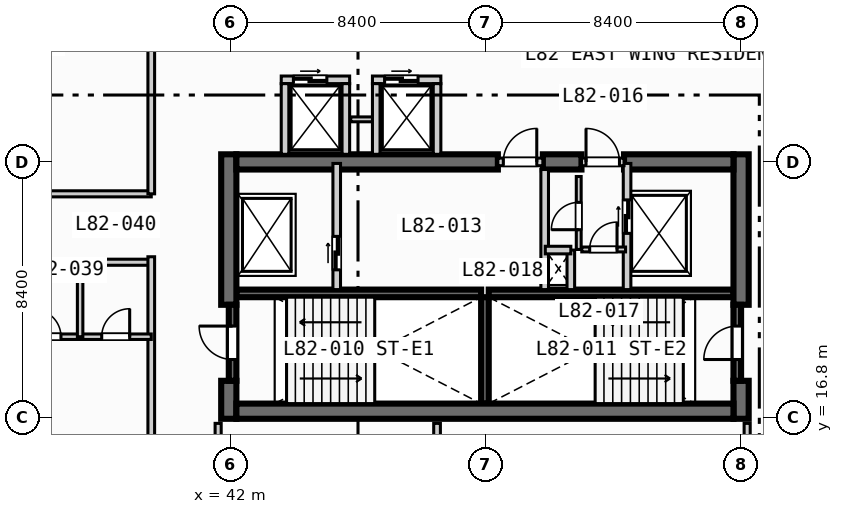
"""IFC4 building model, lengths in metres.
Left out: names, types, materials, properties, quantities, classifications, styles, units other than length and angle.
Written with IfcOpenShell. Run it as: python <this file> out.ifc"""

import sys

from ifc_helpers import new_model, si_unit, direction, frame, frame_2d, origin, place, context, subcontext, project, spatial, rectangle, extrude, element, fill, save


model = new_model("IFC4")
c1 = context("Model", 3, precision=1e-05, world=origin(), true_north=direction((0.0, 1.0)))
c2 = subcontext(c1, "Body", "Model", "MODEL_VIEW")
j1 = project(units=[si_unit("LENGTHUNIT", "METRE"), si_unit("PLANEANGLEUNIT", "RADIAN")], contexts=[c1])
p1 = place(None, origin())
s1 = spatial("IfcSite", under=j1, at=p1, CompositionType="ELEMENT")
p2 = place(p1, origin())
s2 = spatial("IfcBuilding", under=s1, at=p2, CompositionType="ELEMENT")
p3 = place(p2, frame((0.0, 0.0, 332.0)))
s3 = spatial("IfcBuildingStorey", under=s2, at=p3, CompositionType="ELEMENT", Elevation=332.0)
for number, where, z_axis, x_axis in (
    (1, (42.2, 20.875, 0.0), (0.0, 0.0, 1.0), (1.0, 0.0, 0.0)),
    (2, (50.5, 20.875, 0.0), (0.0, 0.0, 1.0), (1.0, 0.0, 0.0)),
):
    element("IfcWall", number, at=place(p3, frame(where, z_axis=z_axis, x_axis=x_axis)), inside=s3, PredefinedType="SOLIDWALL", context=c2, shape_type="SweptSolid", body=[
        extrude(rectangle(XDim=8.05, YDim=0.25, at=frame_2d((4.025, 0.0))), origin(), (0.0, 0.0, 1.0), 3.67),
    ])
p4 = place(p3, frame((50.375, 17.25, 0.0), z_axis=(0.0, 0.0, 1.0), x_axis=(0.0, 1.0, 0.0)))
e3 = element("IfcWall", 3, at=p4, inside=s3, PredefinedType="SOLIDWALL", context=c2, shape_type="SweptSolid", body=[
    extrude(rectangle(XDim=3.5, YDim=0.25, at=frame_2d((1.75, 0.0))), origin(), (0.0, 0.0, 1.0), 3.67),
])
p5 = place(p3, frame((41.95, 16.75, 0.0), z_axis=(0.0, 0.0, 1.0), x_axis=(0.0, 1.0, 0.0)))
e4 = element("IfcWall", 4, at=p5, inside=s3, PredefinedType="SHEAR", context=c2, shape_type="SweptSolid", body=[
    extrude(rectangle(XDim=1.25, YDim=0.5, at=frame_2d((0.625, 0.0))), origin(), (0.0, 0.0, 1.0), 3.67),
])
p6 = place(p3, frame((41.95, 20.5, 0.0), z_axis=(0.0, 0.0, 1.0), x_axis=(0.0, 1.0, 0.0)))
e5 = element("IfcWall", 5, at=p6, inside=s3, PredefinedType="SHEAR", context=c2, shape_type="SweptSolid", body=[
    extrude(rectangle(XDim=4.95, YDim=0.5, at=frame_2d((2.475, 0.0))), origin(), (0.0, 0.0, 1.0), 3.67),
])
p7 = place(p3, frame((58.8, 16.75, 0.0), z_axis=(0.0, 0.0, 1.0), x_axis=(0.0, 1.0, 0.0)))
e6 = element("IfcWall", 6, at=p7, inside=s3, PredefinedType="SHEAR", context=c2, shape_type="SweptSolid", body=[
    extrude(rectangle(XDim=1.25, YDim=0.5, at=frame_2d((0.625, 0.0))), origin(), (0.0, 0.0, 1.0), 3.67),
])
p8 = place(p3, frame((58.8, 20.5, 0.0), z_axis=(0.0, 0.0, 1.0), x_axis=(0.0, 1.0, 0.0)))
e7 = element("IfcWall", 7, at=p8, inside=s3, PredefinedType="SHEAR", context=c2, shape_type="SweptSolid", body=[
    extrude(rectangle(XDim=4.95, YDim=0.5, at=frame_2d((2.475, 0.0))), origin(), (0.0, 0.0, 1.0), 3.67),
])
p9 = place(p3, frame((42.2, 17.0, 0.0), z_axis=(0.0, 0.0, 1.0), x_axis=(1.0, 0.0, 0.0)))
e8 = element("IfcWall", 8, at=p9, inside=s3, PredefinedType="SHEAR", context=c2, shape_type="SweptSolid", body=[
    extrude(rectangle(XDim=16.35, YDim=0.5, at=frame_2d((8.175, 0.0))), origin(), (0.0, 0.0, 1.0), 3.67),
])
p10 = place(p3, frame((42.2, 25.2, 0.0), z_axis=(0.0, 0.0, 1.0), x_axis=(1.0, 0.0, 0.0)))
e9 = element("IfcWall", 9, at=p10, inside=s3, PredefinedType="SHEAR", context=c2, shape_type="SweptSolid", body=[
    extrude(rectangle(XDim=8.6, YDim=0.5, at=frame_2d((4.3, 0.0))), origin(), (0.0, 0.0, 1.0), 3.67),
])
p11 = place(p3, frame((52.28, 25.2, 0.0), z_axis=(0.0, 0.0, 1.0), x_axis=(1.0, 0.0, 0.0)))
e10 = element("IfcWall", 10, at=p11, inside=s3, PredefinedType="SHEAR", context=c2, shape_type="SweptSolid", body=[
    extrude(rectangle(XDim=1.27, YDim=0.5, at=frame_2d((0.635, 0.0))), origin(), (0.0, 0.0, 1.0), 3.67),
])
p12 = place(p3, frame((54.95, 25.2, 0.0), z_axis=(0.0, 0.0, 1.0), x_axis=(1.0, 0.0, 0.0)))
e11 = element("IfcWall", 11, at=p12, inside=s3, PredefinedType="SHEAR", context=c2, shape_type="SweptSolid", body=[
    extrude(rectangle(XDim=3.6, YDim=0.5, at=frame_2d((1.8, 0.0))), origin(), (0.0, 0.0, 1.0), 3.67),
])
p13 = place(p3, frame((42.075, 18.0, 0.0), z_axis=(0.0, 0.0, 1.0), x_axis=(0.0, 1.0, 0.0)))
e12 = element("IfcWall", 12, at=p13, inside=s3, PredefinedType="SOLIDWALL", context=c2, shape_type="SweptSolid", body=[
    extrude(rectangle(XDim=2.5, YDim=0.25, at=frame_2d((1.25, 0.0))), origin(), (0.0, 0.0, 1.0), 3.67),
])
p14 = place(p13, frame((0.7, 0.0, 0.0)))
e13 = element("IfcOpeningElement", 13, at=p14, cuts=e12, PredefinedType="OPENING", context=c2, shape_type="SweptSolid", body=[
    extrude(rectangle(XDim=1.1, YDim=2.15, at=frame_2d((0.55, 1.075))), frame((0.0, 0.135, 0.0), z_axis=(0.0, -1.0, 0.0), x_axis=(1.0, 0.0, 0.0)), (0.0, 0.0, 1.0), 0.27),
])
p15 = place(p3, frame((58.675, 18.0, 0.0), z_axis=(0.0, 0.0, 1.0), x_axis=(0.0, 1.0, 0.0)))
e14 = element("IfcWall", 14, at=p15, inside=s3, PredefinedType="SOLIDWALL", context=c2, shape_type="SweptSolid", body=[
    extrude(rectangle(XDim=2.5, YDim=0.25, at=frame_2d((1.25, 0.0))), origin(), (0.0, 0.0, 1.0), 3.67),
])
p16 = place(p15, frame((0.7, 0.0, 0.0)))
e15 = element("IfcOpeningElement", 15, at=p16, cuts=e14, PredefinedType="OPENING", context=c2, shape_type="SweptSolid", body=[
    extrude(rectangle(XDim=1.1, YDim=2.15, at=frame_2d((0.55, 1.075))), frame((0.0, 0.135, 0.0), z_axis=(0.0, -1.0, 0.0), x_axis=(1.0, 0.0, 0.0)), (0.0, 0.0, 1.0), 0.27),
])
p17 = place(p3, frame((45.5, 21.0, 0.0), z_axis=(0.0, 0.0, 1.0), x_axis=(0.0, 1.0, 0.0)))
e16 = element("IfcWall", 16, at=p17, inside=s3, PredefinedType="SOLIDWALL", context=c2, shape_type="SweptSolid", body=[
    extrude(rectangle(XDim=4.15, YDim=0.25, at=frame_2d((2.075, 0.0))), origin(), (0.0, 0.0, 1.0), 3.67),
])
p18 = place(p17, frame((0.65, 0.0, 0.0)))
e17 = element("IfcOpeningElement", 17, at=p18, cuts=e16, PredefinedType="OPENING", context=c2, shape_type="SweptSolid", body=[
    extrude(rectangle(XDim=1.1, YDim=2.15, at=frame_2d((0.55, 1.075))), frame((0.0, 0.135, 0.0), z_axis=(0.0, -1.0, 0.0), x_axis=(1.0, 0.0, 0.0)), (0.0, 0.0, 1.0), 0.27),
])
p19 = place(p3, frame((50.8, 25.2, 0.0), z_axis=(0.0, 0.0, 1.0), x_axis=(1.0, 0.0, 0.0)))
e18 = element("IfcWall", 18, at=p19, inside=s3, PredefinedType="SOLIDWALL", context=c2, shape_type="SweptSolid", body=[
    extrude(rectangle(XDim=1.48, YDim=0.25, at=frame_2d((0.74, 0.0))), origin(), (0.0, 0.0, 1.0), 3.67),
])
p20 = place(p19, frame((0.18, 0.0, 0.0)))
e19 = element("IfcOpeningElement", 19, at=p20, cuts=e18, PredefinedType="OPENING", context=c2, shape_type="SweptSolid", body=[
    extrude(rectangle(XDim=1.1, YDim=2.15, at=frame_2d((0.55, 1.075))), frame((0.0, 0.135, 0.0), z_axis=(0.0, -1.0, 0.0), x_axis=(1.0, 0.0, 0.0)), (0.0, 0.0, 1.0), 0.27),
])
p21 = place(p3, frame((52.34, 21.0, 0.0), z_axis=(0.0, 0.0, 1.0), x_axis=(0.0, 1.0, 0.0)))
e20 = element("IfcWall", 20, at=p21, inside=s3, PredefinedType="SOLIDWALL", context=c2, shape_type="SweptSolid", body=[
    extrude(rectangle(XDim=3.95, YDim=0.25, at=frame_2d((1.975, 0.0))), origin(), (0.0, 0.0, 1.0), 3.67),
])
p22 = place(p3, frame((55.05, 21.0, 0.0), z_axis=(0.0, 0.0, 1.0), x_axis=(0.0, 1.0, 0.0)))
e21 = element("IfcWall", 21, at=p22, inside=s3, PredefinedType="SOLIDWALL", context=c2, shape_type="SweptSolid", body=[
    extrude(rectangle(XDim=4.15, YDim=0.25, at=frame_2d((2.075, 0.0))), origin(), (0.0, 0.0, 1.0), 3.67),
])
p23 = place(p22, frame((1.85, 0.0, 0.0)))
e22 = element("IfcOpeningElement", 22, at=p23, cuts=e21, PredefinedType="OPENING", context=c2, shape_type="SweptSolid", body=[
    extrude(rectangle(XDim=1.1, YDim=2.15, at=frame_2d((0.55, 1.075))), frame((0.0, 0.135, 0.0), z_axis=(0.0, -1.0, 0.0), x_axis=(1.0, 0.0, 0.0)), (0.0, 0.0, 1.0), 0.27),
])
p24 = place(p3, frame((53.55, 25.2, 0.0), z_axis=(0.0, 0.0, 1.0), x_axis=(1.0, 0.0, 0.0)))
e23 = element("IfcWall", 23, at=p24, inside=s3, PredefinedType="SOLIDWALL", context=c2, shape_type="SweptSolid", body=[
    extrude(rectangle(XDim=1.4, YDim=0.25, at=frame_2d((0.7, 0.0))), origin(), (0.0, 0.0, 1.0), 3.67),
])
p25 = place(p24, frame((0.15, 0.0, 0.0)))
e24 = element("IfcOpeningElement", 24, at=p25, cuts=e23, PredefinedType="OPENING", context=c2, shape_type="SweptSolid", body=[
    extrude(rectangle(XDim=1.1, YDim=2.15, at=frame_2d((0.55, 1.075))), frame((0.0, 0.135, 0.0), z_axis=(0.0, -1.0, 0.0), x_axis=(1.0, 0.0, 0.0)), (0.0, 0.0, 1.0), 0.27),
])
p26 = place(p3, frame((53.2, 21.0, 0.0), z_axis=(0.0, 0.0, 1.0), x_axis=(0.0, 1.0, 0.0)))
e25 = element("IfcWall", 25, at=p26, inside=s3, PredefinedType="SOLIDWALL", context=c2, shape_type="SweptSolid", body=[
    extrude(rectangle(XDim=1.3, YDim=0.25, at=frame_2d((0.65, 0.0))), origin(), (0.0, 0.0, 1.0), 3.67),
])
p27 = place(p3, frame((52.36, 22.3, 0.0), z_axis=(0.0, 0.0, 1.0), x_axis=(1.0, 0.0, 0.0)))
e26 = element("IfcWall", 26, at=p27, inside=s3, PredefinedType="SOLIDWALL", context=c2, shape_type="SweptSolid", body=[
    extrude(rectangle(XDim=0.84, YDim=0.25, at=frame_2d((0.42, 0.0))), origin(), (0.0, 0.0, 1.0), 3.67),
])
p28 = place(p3, frame((53.56, 22.32, 0.0), z_axis=(0.0, 0.0, 1.0), x_axis=(1.0, 0.0, 0.0)))
e27 = element("IfcWall", 27, at=p28, inside=s3, PredefinedType="PARTITIONING", context=c2, shape_type="SweptSolid", body=[
    extrude(rectangle(XDim=1.44, YDim=0.16, at=frame_2d((0.72, 0.0))), origin(), (0.0, 0.0, 1.0), 3.67),
])
p29 = place(p28, frame((0.26, 0.0, 0.0)))
e28 = element("IfcOpeningElement", 28, at=p29, cuts=e27, PredefinedType="OPENING", context=c2, shape_type="SweptSolid", body=[
    extrude(rectangle(XDim=0.9, YDim=2.1, at=frame_2d((0.45, 1.05))), frame((0.0, 0.09, 0.0), z_axis=(0.0, -1.0, 0.0), x_axis=(1.0, 0.0, 0.0)), (0.0, 0.0, 1.0), 0.18),
])
p30 = place(p3, frame((53.46, 22.32, 0.0), z_axis=(0.0, 0.0, 1.0), x_axis=(0.0, 1.0, 0.0)))
e29 = element("IfcWall", 29, at=p30, inside=s3, PredefinedType="PARTITIONING", context=c2, shape_type="SweptSolid", body=[
    extrude(rectangle(XDim=2.4, YDim=0.16, at=frame_2d((1.2, 0.0))), origin(), (0.0, 0.0, 1.0), 3.67),
])
p31 = place(p30, frame((0.65, 0.0, 0.0)))
e30 = element("IfcOpeningElement", 30, at=p31, cuts=e29, PredefinedType="OPENING", context=c2, shape_type="SweptSolid", body=[
    extrude(rectangle(XDim=0.9, YDim=2.1, at=frame_2d((0.45, 1.05))), frame((0.0, 0.09, 0.0), z_axis=(0.0, -1.0, 0.0), x_axis=(1.0, 0.0, 0.0)), (0.0, 0.0, 1.0), 0.18),
])
p32 = place(p3, frame((43.675, 27.9, 0.0), z_axis=(0.0, 0.0, 1.0), x_axis=(1.0, 0.0, 0.0)))
e31 = element("IfcWall", 31, at=p32, inside=s3, PredefinedType="SOLIDWALL", context=c2, shape_type="SweptSolid", body=[
    extrude(rectangle(XDim=2.25, YDim=0.25, at=frame_2d((1.125, 0.0))), origin(), (0.0, 0.0, 1.0), 3.67),
])
p33 = place(p32, frame((0.4, 0.0, 0.0)))
e32 = element("IfcOpeningElement", 32, at=p33, cuts=e31, PredefinedType="OPENING", context=c2, shape_type="SweptSolid", body=[
    extrude(rectangle(XDim=1.1, YDim=2.15, at=frame_2d((0.55, 1.075))), frame((0.0, 0.135, 0.0), z_axis=(0.0, -1.0, 0.0), x_axis=(1.0, 0.0, 0.0)), (0.0, 0.0, 1.0), 0.27),
])
for number, where, z_axis, x_axis in (
    (33, (43.8, 25.45, 0.0), (0.0, 0.0, 1.0), (0.0, 1.0, 0.0)),
    (34, (45.8, 25.45, 0.0), (0.0, 0.0, 1.0), (0.0, 1.0, 0.0)),
):
    element("IfcWall", number, at=place(p3, frame(where, z_axis=z_axis, x_axis=x_axis)), inside=s3, PredefinedType="SOLIDWALL", context=c2, shape_type="SweptSolid", body=[
        extrude(rectangle(XDim=2.325, YDim=0.25, at=frame_2d((1.163, 0.0))), origin(), (0.0, 0.0, 1.0), 3.67),
    ])
p34 = place(p3, frame((45.96, 26.6, 0.0), z_axis=(0.0, 0.0, 1.0), x_axis=(1.0, 0.0, 0.0)))
e35 = element("IfcWall", 35, at=p34, inside=s3, PredefinedType="PARTITIONING", context=c2, shape_type="SweptSolid", body=[
    extrude(rectangle(XDim=0.88, YDim=0.16, at=frame_2d((0.44, 0.0))), origin(), (0.0, 0.0, 1.0), 3.67),
])
p35 = place(p3, frame((46.675, 27.9, 0.0), z_axis=(0.0, 0.0, 1.0), x_axis=(1.0, 0.0, 0.0)))
e36 = element("IfcWall", 36, at=p35, inside=s3, PredefinedType="SOLIDWALL", context=c2, shape_type="SweptSolid", body=[
    extrude(rectangle(XDim=2.25, YDim=0.25, at=frame_2d((1.125, 0.0))), origin(), (0.0, 0.0, 1.0), 3.67),
])
p36 = place(p35, frame((0.4, 0.0, 0.0)))
e37 = element("IfcOpeningElement", 37, at=p36, cuts=e36, PredefinedType="OPENING", context=c2, shape_type="SweptSolid", body=[
    extrude(rectangle(XDim=1.1, YDim=2.15, at=frame_2d((0.55, 1.075))), frame((0.0, 0.135, 0.0), z_axis=(0.0, -1.0, 0.0), x_axis=(1.0, 0.0, 0.0)), (0.0, 0.0, 1.0), 0.27),
])
for number, where, z_axis, x_axis in (
    (38, (46.8, 25.45, 0.0), (0.0, 0.0, 1.0), (0.0, 1.0, 0.0)),
    (39, (48.8, 25.45, 0.0), (0.0, 0.0, 1.0), (0.0, 1.0, 0.0)),
):
    element("IfcWall", number, at=place(p3, frame(where, z_axis=z_axis, x_axis=x_axis)), inside=s3, PredefinedType="SOLIDWALL", context=c2, shape_type="SweptSolid", body=[
        extrude(rectangle(XDim=2.325, YDim=0.25, at=frame_2d((1.163, 0.0))), origin(), (0.0, 0.0, 1.0), 3.67),
    ])
p37 = place(p3, frame((30.6, 24.15, 0.0), z_axis=(0.0, 0.0, 1.0), x_axis=(1.0, 0.0, 0.0)))
e40 = element("IfcWall", 40, at=p37, inside=s3, PredefinedType="PARTITIONING", context=c2, shape_type="SweptSolid", body=[
    extrude(rectangle(XDim=8.8, YDim=0.2, at=frame_2d((4.4, 0.0))), origin(), (0.0, 0.0, 1.0), 3.67),
])
p38 = place(p37, frame((3.75, 0.0, 0.0)))
e41 = element("IfcOpeningElement", 41, at=p38, cuts=e40, PredefinedType="OPENING", context=c2, shape_type="SweptSolid", body=[
    extrude(rectangle(XDim=0.92, YDim=2.1, at=frame_2d((0.46, 1.05))), frame((0.0, 0.11, 0.0), z_axis=(0.0, -1.0, 0.0), x_axis=(1.0, 0.0, 0.0)), (0.0, 0.0, 1.0), 0.22),
])
p39 = place(p3, frame((39.4, 24.15, 0.0), z_axis=(0.0, 0.0, 1.0), x_axis=(0.0, 1.0, 0.0)))
e42 = element("IfcWall", 42, at=p39, inside=s3, PredefinedType="PARTITIONING", context=c2, shape_type="SweptSolid", body=[
    extrude(rectangle(XDim=9.15, YDim=0.22, at=frame_2d((4.575, 0.0))), origin(), (0.0, 0.0, 1.0), 3.67),
])
p40 = place(p3, frame((41.6, 8.65, 0.0), z_axis=(0.0, 0.0, 1.0), x_axis=(0.0, 1.0, 0.0)))
e43 = element("IfcWall", 43, at=p40, inside=s3, PredefinedType="PARTITIONING", context=c2, shape_type="SweptSolid", body=[
    extrude(rectangle(XDim=7.95, YDim=0.2, at=frame_2d((3.975, 0.0))), origin(), (0.0, 0.0, 1.0), 3.67),
])
p41 = place(p40, frame((2.2, 0.0, 0.0)))
e44 = element("IfcOpeningElement", 44, at=p41, cuts=e43, PredefinedType="OPENING", context=c2, shape_type="SweptSolid", body=[
    extrude(rectangle(XDim=0.92, YDim=2.1, at=frame_2d((0.46, 1.05))), frame((0.0, 0.11, 0.0), z_axis=(0.0, -1.0, 0.0), x_axis=(1.0, 0.0, 0.0)), (0.0, 0.0, 1.0), 0.22),
])
p42 = place(p3, frame((59.0, 8.65, 0.0), z_axis=(0.0, 0.0, 1.0), x_axis=(0.0, 1.0, 0.0)))
e45 = element("IfcWall", 45, at=p42, inside=s3, PredefinedType="PARTITIONING", context=c2, shape_type="SweptSolid", body=[
    extrude(rectangle(XDim=7.95, YDim=0.2, at=frame_2d((3.975, 0.0))), origin(), (0.0, 0.0, 1.0), 3.36),
])
p43 = place(p42, frame((2.2, 0.0, 0.0)))
e46 = element("IfcOpeningElement", 46, at=p43, cuts=e45, PredefinedType="OPENING", context=c2, shape_type="SweptSolid", body=[
    extrude(rectangle(XDim=0.92, YDim=2.1, at=frame_2d((0.46, 1.05))), frame((0.0, 0.11, 0.0), z_axis=(0.0, -1.0, 0.0), x_axis=(1.0, 0.0, 0.0)), (0.0, 0.0, 1.0), 0.22),
])
p44 = place(p3, frame((48.8, 8.65, 0.0), z_axis=(0.0, 0.0, 1.0), x_axis=(0.0, 1.0, 0.0)))
e47 = element("IfcWall", 47, at=p44, inside=s3, PredefinedType="PARTITIONING", context=c2, shape_type="SweptSolid", body=[
    extrude(rectangle(XDim=7.95, YDim=0.22, at=frame_2d((3.975, 0.0))), origin(), (0.0, 0.0, 1.0), 3.67),
])
p45 = place(p3, frame((11.8, 21.9, 0.0), z_axis=(0.0, 0.0, 1.0), x_axis=(1.0, 0.0, 0.0)))
e48 = element("IfcWall", 48, at=p45, inside=s3, PredefinedType="PARTITIONING", context=c2, shape_type="SweptSolid", body=[
    extrude(rectangle(XDim=27.6, YDim=0.2, at=frame_2d((13.8, 0.0))), origin(), (0.0, 0.0, 1.0), 3.67),
])
p46 = place(p45, frame((7.42, 0.0, 0.0)))
e49 = element("IfcOpeningElement", 49, at=p46, cuts=e48, PredefinedType="OPENING", context=c2, shape_type="SweptSolid", body=[
    extrude(rectangle(XDim=1.0, YDim=2.15, at=frame_2d((0.5, 1.075))), frame((0.0, 0.11, 0.0), z_axis=(0.0, -1.0, 0.0), x_axis=(1.0, 0.0, 0.0)), (0.0, 0.0, 1.0), 0.22),
])
p47 = place(p45, frame((21.22, 0.0, 0.0)))
e50 = element("IfcOpeningElement", 50, at=p47, cuts=e48, PredefinedType="OPENING", context=c2, shape_type="SweptSolid", body=[
    extrude(rectangle(XDim=1.0, YDim=2.15, at=frame_2d((0.5, 1.075))), frame((0.0, 0.11, 0.0), z_axis=(0.0, -1.0, 0.0), x_axis=(1.0, 0.0, 0.0)), (0.0, 0.0, 1.0), 0.22),
])
p48 = place(p3, frame((39.4, 8.6, 0.0), z_axis=(0.0, 0.0, 1.0), x_axis=(0.0, 1.0, 0.0)))
e51 = element("IfcWall", 51, at=p48, inside=s3, PredefinedType="PARTITIONING", context=c2, shape_type="SweptSolid", body=[
    extrude(rectangle(XDim=13.48, YDim=0.22, at=frame_2d((6.74, 0.0))), origin(), (0.0, 0.0, 1.0), 3.67),
])
p49 = place(p3, frame((34.9, 19.45, 0.0), z_axis=(0.0, 0.0, 1.0), x_axis=(1.0, 0.0, 0.0)))
e52 = element("IfcWall", 52, at=p49, inside=s3, PredefinedType="PLUMBINGWALL", context=c2, shape_type="SweptSolid", body=[
    extrude(rectangle(XDim=4.5, YDim=0.18, at=frame_2d((2.25, 0.0))), origin(), (0.0, 0.0, 1.0), 3.67),
])
p50 = place(p49, frame((0.63, 0.0, 0.0)))
e53 = element("IfcOpeningElement", 53, at=p50, cuts=e52, PredefinedType="OPENING", context=c2, shape_type="SweptSolid", body=[
    extrude(rectangle(XDim=0.9, YDim=2.1, at=frame_2d((0.45, 1.05))), frame((0.0, 0.1, 0.0), z_axis=(0.0, -1.0, 0.0), x_axis=(1.0, 0.0, 0.0)), (0.0, 0.0, 1.0), 0.2),
])
p51 = place(p49, frame((2.87, 0.0, 0.0)))
e54 = element("IfcOpeningElement", 54, at=p51, cuts=e52, PredefinedType="OPENING", context=c2, shape_type="SweptSolid", body=[
    extrude(rectangle(XDim=0.92, YDim=2.1, at=frame_2d((0.46, 1.05))), frame((0.0, 0.1, 0.0), z_axis=(0.0, -1.0, 0.0), x_axis=(1.0, 0.0, 0.0)), (0.0, 0.0, 1.0), 0.2),
])
p52 = place(p3, frame((37.06, 19.45, 0.0), z_axis=(0.0, 0.0, 1.0), x_axis=(0.0, 1.0, 0.0)))
e55 = element("IfcWall", 55, at=p52, inside=s3, PredefinedType="PLUMBINGWALL", context=c2, shape_type="SweptSolid", body=[
    extrude(rectangle(XDim=2.45, YDim=0.18, at=frame_2d((1.225, 0.0))), origin(), (0.0, 0.0, 1.0), 3.67),
])
p53 = place(p14, origin())
e56 = element("IfcDoor", 56, at=p53, inside=s3, OperationType="SINGLE_SWING_RIGHT", PredefinedType="DOOR", context=c2, shape_type="SweptSolid", body=[
    extrude(rectangle(XDim=1.1, YDim=2.15, at=frame_2d((0.55, 1.075))), frame((0.0, 0.025, 0.0), z_axis=(0.0, -1.0, 0.0), x_axis=(1.0, 0.0, 0.0)), (0.0, 0.0, 1.0), 0.05),
])
fill(e13, e56)
p54 = place(p16, origin())
e57 = element("IfcDoor", 57, at=p54, inside=s3, OperationType="SINGLE_SWING_LEFT", PredefinedType="DOOR", context=c2, shape_type="SweptSolid", body=[
    extrude(rectangle(XDim=1.1, YDim=2.15, at=frame_2d((0.55, 1.075))), frame((0.0, 0.025, 0.0), z_axis=(0.0, -1.0, 0.0), x_axis=(1.0, 0.0, 0.0)), (0.0, 0.0, 1.0), 0.05),
])
fill(e15, e57)
p55 = place(p18, origin())
e58 = element("IfcDoor", 58, at=p55, inside=s3, OperationType="SLIDING_TO_LEFT", PredefinedType="DOOR", context=c2, shape_type="SweptSolid", body=[
    extrude(rectangle(XDim=1.1, YDim=2.15, at=frame_2d((0.55, 1.075))), frame((0.0, 0.025, 0.0), z_axis=(0.0, -1.0, 0.0), x_axis=(1.0, 0.0, 0.0)), (0.0, 0.0, 1.0), 0.05),
])
fill(e17, e58)
p56 = place(p20, origin())
e59 = element("IfcDoor", 59, at=p56, inside=s3, OperationType="SINGLE_SWING_RIGHT", PredefinedType="DOOR", context=c2, shape_type="SweptSolid", body=[
    extrude(rectangle(XDim=1.1, YDim=2.15, at=frame_2d((0.55, 1.075))), frame((0.0, 0.025, 0.0), z_axis=(0.0, -1.0, 0.0), x_axis=(1.0, 0.0, 0.0)), (0.0, 0.0, 1.0), 0.05),
])
fill(e19, e59)
p57 = place(p23, origin())
e60 = element("IfcDoor", 60, at=p57, inside=s3, OperationType="SLIDING_TO_LEFT", PredefinedType="DOOR", context=c2, shape_type="SweptSolid", body=[
    extrude(rectangle(XDim=1.1, YDim=2.15, at=frame_2d((0.55, 1.075))), frame((0.0, 0.025, 0.0), z_axis=(0.0, -1.0, 0.0), x_axis=(1.0, 0.0, 0.0)), (0.0, 0.0, 1.0), 0.05),
])
fill(e22, e60)
p58 = place(p25, origin())
e61 = element("IfcDoor", 61, at=p58, inside=s3, OperationType="SINGLE_SWING_LEFT", PredefinedType="DOOR", context=c2, shape_type="SweptSolid", body=[
    extrude(rectangle(XDim=1.1, YDim=2.15, at=frame_2d((0.55, 1.075))), frame((0.0, 0.025, 0.0), z_axis=(0.0, -1.0, 0.0), x_axis=(1.0, 0.0, 0.0)), (0.0, 0.0, 1.0), 0.05),
])
fill(e24, e61)
p59 = place(p29, origin())
e62 = element("IfcDoor", 62, at=p59, inside=s3, OperationType="SINGLE_SWING_RIGHT", PredefinedType="DOOR", context=c2, shape_type="SweptSolid", body=[
    extrude(rectangle(XDim=0.9, YDim=2.1, at=frame_2d((0.45, 1.05))), frame((0.0, 0.025, 0.0), z_axis=(0.0, -1.0, 0.0), x_axis=(1.0, 0.0, 0.0)), (0.0, 0.0, 1.0), 0.05),
])
fill(e28, e62)
p60 = place(p31, origin())
e63 = element("IfcDoor", 63, at=p60, inside=s3, OperationType="SINGLE_SWING_LEFT", PredefinedType="DOOR", context=c2, shape_type="SweptSolid", body=[
    extrude(rectangle(XDim=0.9, YDim=2.1, at=frame_2d((0.45, 1.05))), frame((0.0, 0.025, 0.0), z_axis=(0.0, -1.0, 0.0), x_axis=(1.0, 0.0, 0.0)), (0.0, 0.0, 1.0), 0.05),
])
fill(e30, e63)
p61 = place(p33, origin())
e64 = element("IfcDoor", 64, at=p61, inside=s3, OperationType="SLIDING_TO_LEFT", PredefinedType="DOOR", context=c2, shape_type="SweptSolid", body=[
    extrude(rectangle(XDim=1.1, YDim=2.15, at=frame_2d((0.55, 1.075))), frame((0.0, 0.025, 0.0), z_axis=(0.0, -1.0, 0.0), x_axis=(1.0, 0.0, 0.0)), (0.0, 0.0, 1.0), 0.05),
])
fill(e32, e64)
p62 = place(p36, origin())
e65 = element("IfcDoor", 65, at=p62, inside=s3, OperationType="SLIDING_TO_LEFT", PredefinedType="DOOR", context=c2, shape_type="SweptSolid", body=[
    extrude(rectangle(XDim=1.1, YDim=2.15, at=frame_2d((0.55, 1.075))), frame((0.0, 0.025, 0.0), z_axis=(0.0, -1.0, 0.0), x_axis=(1.0, 0.0, 0.0)), (0.0, 0.0, 1.0), 0.05),
])
fill(e37, e65)
p63 = place(p50, origin())
e66 = element("IfcDoor", 66, at=p63, inside=s3, OperationType="SINGLE_SWING_LEFT", PredefinedType="DOOR", context=c2, shape_type="SweptSolid", body=[
    extrude(rectangle(XDim=0.9, YDim=2.1, at=frame_2d((0.45, 1.05))), frame((0.0, 0.025, 0.0), z_axis=(0.0, -1.0, 0.0), x_axis=(1.0, 0.0, 0.0)), (0.0, 0.0, 1.0), 0.05),
])
fill(e53, e66)
p64 = place(p51, origin())
e67 = element("IfcDoor", 67, at=p64, inside=s3, OperationType="SINGLE_SWING_RIGHT", PredefinedType="DOOR", context=c2, shape_type="SweptSolid", body=[
    extrude(rectangle(XDim=0.92, YDim=2.1, at=frame_2d((0.46, 1.05))), frame((0.0, 0.025, 0.0), z_axis=(0.0, -1.0, 0.0), x_axis=(1.0, 0.0, 0.0)), (0.0, 0.0, 1.0), 0.05),
])
fill(e54, e67)
save(model, sys.argv[1])
